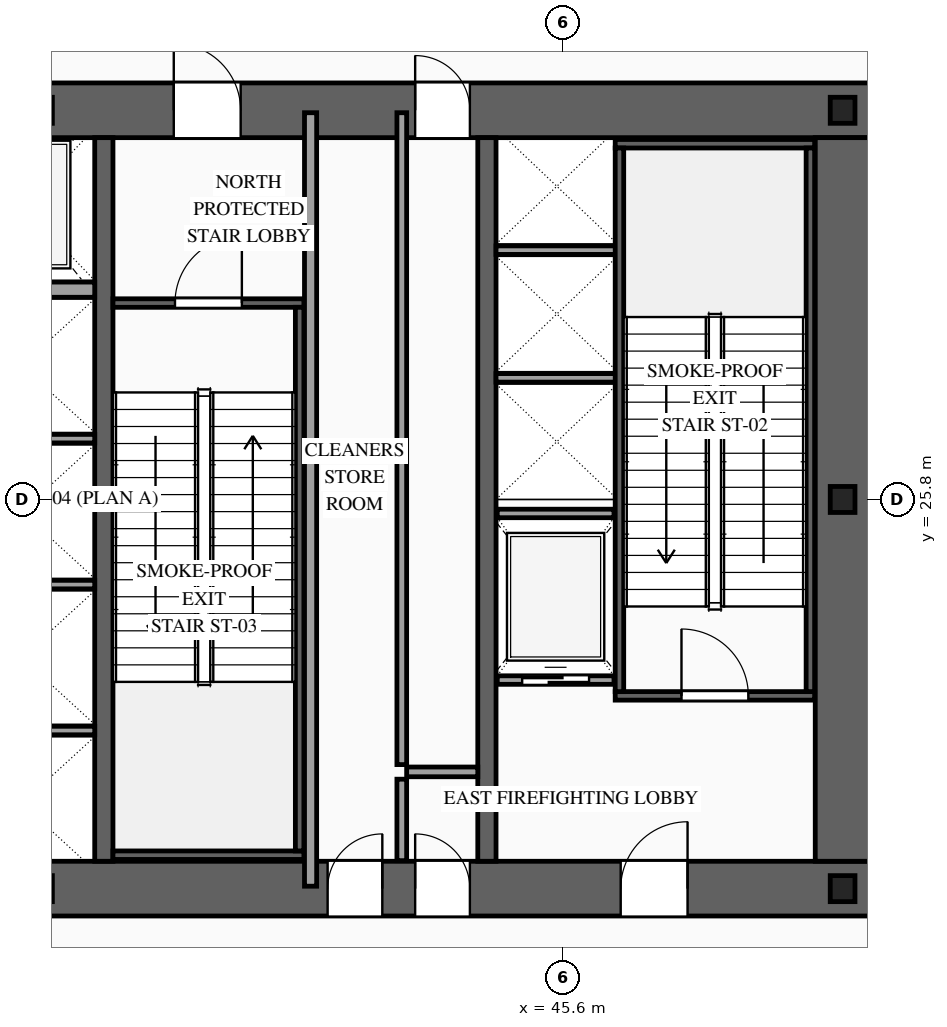
"""IFC4 building model, lengths in metres.
Left out: names, types, materials, properties, quantities, classifications, styles, units other than length and angle.
Written with IfcOpenShell. Run it as: python <this file> out.ifc"""

import sys

from ifc_helpers import new_model, si_unit, direction, frame, frame_2d, origin, origin_2d, place, context, subcontext, project, spatial, rectangle, i_section, extrude, source, transform, mapped, element, fill, save


model = new_model("IFC4")
c1 = context("Model", 3, precision=1e-05, world=origin(), true_north=direction((0.0, 1.0)))
c2 = subcontext(c1, "Body", "Model", "MODEL_VIEW")
j1 = project(units=[si_unit("LENGTHUNIT", "METRE"), si_unit("PLANEANGLEUNIT", "RADIAN")], contexts=[c1])
p1 = place(None, origin())
s1 = spatial("IfcSite", under=j1, at=p1, CompositionType="ELEMENT")
p2 = place(p1, origin())
s2 = spatial("IfcBuilding", under=s1, at=p2, CompositionType="ELEMENT")
p3 = place(p2, frame((0.0, 0.0, 19.8)))
s3 = spatial("IfcBuildingStorey", under=s2, at=p3, CompositionType="ELEMENT", Elevation=19.8)
p4 = place(p3, frame((23.35, 19.4, 0.0), z_axis=(0.0, 0.0, 1.0), x_axis=(1.0, 0.0, 0.0)))
e1 = element("IfcWall", 1, at=p4, inside=s3, PredefinedType="SHEAR", context=c2, shape_type="SweptSolid", body=[
    extrude(rectangle(XDim=27.3, YDim=0.9, at=frame_2d((13.65, 0.0))), origin(), (0.0, 0.0, 1.0), 6.0),
])
p5 = place(p4, frame((2.1, 0.0, 0.0)))
e2 = element("IfcOpeningElement", 2, at=p5, cuts=e1, PredefinedType="OPENING", context=c2, shape_type="SweptSolid", body=[
    extrude(rectangle(XDim=1.1, YDim=2.2, at=frame_2d((0.55, 1.1))), frame((0.0, 0.465, 0.0), z_axis=(0.0, -1.0, 0.0), x_axis=(1.0, 0.0, 0.0)), (0.0, 0.0, 1.0), 0.93),
])
p6 = place(p4, frame((10.0, 0.0, 0.0)))
e3 = element("IfcOpeningElement", 3, at=p6, cuts=e1, PredefinedType="OPENING", context=c2, shape_type="SweptSolid", body=[
    extrude(rectangle(XDim=1.1, YDim=2.2, at=frame_2d((0.55, 1.1))), frame((0.0, 0.465, 0.0), z_axis=(0.0, -1.0, 0.0), x_axis=(1.0, 0.0, 0.0)), (0.0, 0.0, 1.0), 0.93),
])
p7 = place(p4, frame((23.2, 0.0, 0.0)))
e4 = element("IfcOpeningElement", 4, at=p7, cuts=e1, PredefinedType="OPENING", context=c2, shape_type="SweptSolid", body=[
    extrude(rectangle(XDim=1.1, YDim=2.2, at=frame_2d((0.55, 1.1))), frame((0.0, 0.465, 0.0), z_axis=(0.0, -1.0, 0.0), x_axis=(1.0, 0.0, 0.0)), (0.0, 0.0, 1.0), 0.93),
])
p8 = place(p4, frame((19.82, 0.0, 0.0)))
e5 = element("IfcOpeningElement", 5, at=p8, cuts=e1, PredefinedType="OPENING", context=c2, shape_type="SweptSolid", body=[
    extrude(rectangle(XDim=0.9, YDim=2.15, at=frame_2d((0.45, 1.075))), frame((0.0, 0.465, 0.0), z_axis=(0.0, -1.0, 0.0), x_axis=(1.0, 0.0, 0.0)), (0.0, 0.0, 1.0), 0.93),
])
p9 = place(p4, frame((18.38, 0.0, 0.0)))
e6 = element("IfcOpeningElement", 6, at=p9, cuts=e1, PredefinedType="OPENING", context=c2, shape_type="SweptSolid", body=[
    extrude(rectangle(XDim=0.9, YDim=2.15, at=frame_2d((0.45, 1.075))), frame((0.0, 0.465, 0.0), z_axis=(0.0, -1.0, 0.0), x_axis=(1.0, 0.0, 0.0)), (0.0, 0.0, 1.0), 0.93),
])
p10 = place(p3, frame((23.35, 32.2, 0.0), z_axis=(0.0, 0.0, 1.0), x_axis=(1.0, 0.0, 0.0)))
e7 = element("IfcWall", 7, at=p10, inside=s3, PredefinedType="SHEAR", context=c2, shape_type="SweptSolid", body=[
    extrude(rectangle(XDim=27.3, YDim=0.9, at=frame_2d((13.65, 0.0))), origin(), (0.0, 0.0, 1.0), 6.0),
])
p11 = place(p10, frame((4.72, 0.0, 0.0)))
e8 = element("IfcOpeningElement", 8, at=p11, cuts=e7, PredefinedType="OPENING", context=c2, shape_type="SweptSolid", body=[
    extrude(rectangle(XDim=0.9, YDim=2.15, at=frame_2d((0.45, 1.075))), frame((0.0, 0.465, 0.0), z_axis=(0.0, -1.0, 0.0), x_axis=(1.0, 0.0, 0.0)), (0.0, 0.0, 1.0), 0.93),
])
p12 = place(p10, frame((10.0, 0.0, 0.0)))
e9 = element("IfcOpeningElement", 9, at=p12, cuts=e7, PredefinedType="OPENING", context=c2, shape_type="SweptSolid", body=[
    extrude(rectangle(XDim=1.1, YDim=2.2, at=frame_2d((0.55, 1.1))), frame((0.0, 0.465, 0.0), z_axis=(0.0, -1.0, 0.0), x_axis=(1.0, 0.0, 0.0)), (0.0, 0.0, 1.0), 0.93),
])
p13 = place(p10, frame((15.85, 0.0, 0.0)))
e10 = element("IfcOpeningElement", 10, at=p13, cuts=e7, PredefinedType="OPENING", context=c2, shape_type="SweptSolid", body=[
    extrude(rectangle(XDim=1.1, YDim=2.2, at=frame_2d((0.55, 1.1))), frame((0.0, 0.465, 0.0), z_axis=(0.0, -1.0, 0.0), x_axis=(1.0, 0.0, 0.0)), (0.0, 0.0, 1.0), 0.93),
])
p14 = place(p10, frame((19.82, 0.0, 0.0)))
e11 = element("IfcOpeningElement", 11, at=p14, cuts=e7, PredefinedType="OPENING", context=c2, shape_type="SweptSolid", body=[
    extrude(rectangle(XDim=0.9, YDim=2.15, at=frame_2d((0.45, 1.075))), frame((0.0, 0.465, 0.0), z_axis=(0.0, -1.0, 0.0), x_axis=(1.0, 0.0, 0.0)), (0.0, 0.0, 1.0), 0.93),
])
m1 = source(origin(), c2, "Body", "SweptSolid", [
    extrude(rectangle(XDim=11.9, YDim=0.9, at=frame_2d((5.95, 0.0))), origin(), (0.0, 0.0, 1.0), 6.0),
])
p15 = place(p3, frame((50.2, 19.85, 0.0), z_axis=(0.0, 0.0, 1.0), x_axis=(0.0, 1.0, 0.0)))
e12 = element("IfcWall", 12, at=p15, inside=s3, PredefinedType="SHEAR", context=c2, shape_type="MappedRepresentation", body=[
    mapped(m1, transform((0.0, 0.0, 0.0), scale=1.0)),
])
m2 = source(origin(), c2, "Body", "SweptSolid", [
    extrude(rectangle(XDim=11.9, YDim=0.3, at=frame_2d((5.95, 0.0))), origin(), (0.0, 0.0, 1.0), 6.0),
])
for number, where, z_axis, x_axis in (
    (13, (38.05, 19.85, 0.0), (0.0, 0.0, 1.0), (0.0, 1.0, 0.0)),
    (14, (44.35, 19.85, 0.0), (0.0, 0.0, 1.0), (0.0, 1.0, 0.0)),
):
    element("IfcWall", number, at=place(p3, frame(where, z_axis=z_axis, x_axis=x_axis)), inside=s3, PredefinedType="SOLIDWALL", context=c2, shape_type="MappedRepresentation", body=[
        mapped(m2, transform((0.0, 0.0, 0.0), scale=1.0)),
    ])
m3 = source(origin(), c2, "Body", "SweptSolid", [
    extrude(i_section(OverallWidth=0.407, OverallDepth=0.428, WebThickness=0.02, FlangeThickness=0.035, at=origin_2d()), origin(), (0.0, 0.0, 1.0), 6.0),
])
for number, where, z_axis, x_axis in (
    (15, (37.0, 19.4, 0.0), (0.0, 0.0, 1.0), (1.0, 0.0, 0.0)),
    (16, (50.2, 19.4, 0.0), (0.0, 0.0, 1.0), (1.0, 0.0, 0.0)),
    (17, (50.2, 25.8, 0.0), (0.0, 0.0, 1.0), (1.0, 0.0, 0.0)),
    (18, (37.0, 32.2, 0.0), (0.0, 0.0, 1.0), (1.0, 0.0, 0.0)),
    (19, (50.2, 32.2, 0.0), (0.0, 0.0, 1.0), (1.0, 0.0, 0.0)),
):
    element("IfcColumn", number, at=place(p3, frame(where, z_axis=z_axis, x_axis=x_axis)), inside=s3, PredefinedType="COLUMN", context=c2, shape_type="MappedRepresentation", body=[
        mapped(m3, transform((0.0, 0.0, 0.0), scale=1.0)),
    ])
p16 = place(p3, frame((44.52, 22.83, 0.0), z_axis=(0.0, 0.0, 1.0), x_axis=(1.0, 0.0, 0.0)))
e20 = element("IfcWall", 20, at=p16, inside=s3, PredefinedType="SOLIDWALL", context=c2, shape_type="SweptSolid", body=[
    extrude(rectangle(XDim=1.92, YDim=0.14, at=frame_2d((0.96, 0.0))), origin(), (0.0, 0.0, 1.0), 5.68),
])
p17 = place(p16, frame((0.41, 0.0, 0.0)))
e21 = element("IfcOpeningElement", 21, at=p17, cuts=e20, PredefinedType="OPENING", context=c2, shape_type="SweptSolid", body=[
    extrude(rectangle(XDim=1.1, YDim=2.2, at=frame_2d((0.55, 1.1))), frame((0.0, 0.085, 0.0), z_axis=(0.0, -1.0, 0.0), x_axis=(1.0, 0.0, 0.0)), (0.0, 0.0, 1.0), 0.17),
])
m4 = source(origin(), c2, "Body", "SweptSolid", [
    extrude(rectangle(XDim=1.92, YDim=0.14, at=frame_2d((0.96, 0.0))), origin(), (0.0, 0.0, 1.0), 5.68),
])
p18 = place(p3, frame((44.52, 25.57, 0.0), z_axis=(0.0, 0.0, 1.0), x_axis=(1.0, 0.0, 0.0)))
e22 = element("IfcWall", 22, at=p18, inside=s3, PredefinedType="SOLIDWALL", context=c2, shape_type="MappedRepresentation", body=[
    mapped(m4, transform((0.0, 0.0, 0.0), scale=1.0)),
])
m5 = source(origin(), c2, "Body", "SweptSolid", [
    extrude(rectangle(XDim=2.4, YDim=0.14, at=frame_2d((1.2, 0.0))), origin(), (0.0, 0.0, 1.0), 5.68),
])
for number, where, z_axis, x_axis in (
    (23, (35.5, 22.0, 0.0), (0.0, 0.0, 1.0), (1.0, 0.0, 0.0)),
    (24, (35.5, 24.4, 0.0), (0.0, 0.0, 1.0), (1.0, 0.0, 0.0)),
    (25, (35.5, 26.8, 0.0), (0.0, 0.0, 1.0), (1.0, 0.0, 0.0)),
):
    element("IfcWall", number, at=place(p3, frame(where, z_axis=z_axis, x_axis=x_axis)), inside=s3, PredefinedType="SOLIDWALL", context=c2, shape_type="MappedRepresentation", body=[
        mapped(m5, transform((0.0, 0.0, 0.0), scale=1.0)),
    ])
m6 = source(origin(), c2, "Body", "SweptSolid", [
    extrude(rectangle(XDim=2.4, YDim=0.25, at=frame_2d((1.2, 0.0))), origin(), (0.0, 0.0, 1.0), 5.68),
])
p19 = place(p3, frame((35.5, 29.25, 0.0), z_axis=(0.0, 0.0, 1.0), x_axis=(1.0, 0.0, 0.0)))
e26 = element("IfcWall", 26, at=p19, inside=s3, PredefinedType="SOLIDWALL", context=c2, shape_type="MappedRepresentation", body=[
    mapped(m6, transform((0.0, 0.0, 0.0), scale=1.0)),
])
m7 = source(origin(), c2, "Body", "SweptSolid", [
    extrude(rectangle(XDim=2.0, YDim=0.14, at=frame_2d((1.0, 0.0))), origin(), (0.0, 0.0, 1.0), 5.68),
])
for number, where, z_axis, x_axis in (
    (27, (44.5, 27.8, 0.0), (0.0, 0.0, 1.0), (1.0, 0.0, 0.0)),
    (28, (44.5, 29.9, 0.0), (0.0, 0.0, 1.0), (1.0, 0.0, 0.0)),
):
    element("IfcWall", number, at=place(p3, frame(where, z_axis=z_axis, x_axis=x_axis)), inside=s3, PredefinedType="SOLIDWALL", context=c2, shape_type="MappedRepresentation", body=[
        mapped(m7, transform((0.0, 0.0, 0.0), scale=1.0)),
    ])
p20 = place(p3, frame((46.46, 22.57, 0.0), z_axis=(0.0, 0.0, 1.0), x_axis=(1.0, 0.0, 0.0)))
e29 = element("IfcWall", 29, at=p20, inside=s3, PredefinedType="SOLIDWALL", context=c2, shape_type="SweptSolid", body=[
    extrude(rectangle(XDim=3.28, YDim=0.14, at=frame_2d((1.64, 0.0))), origin(), (0.0, 0.0, 1.0), 5.68),
])
p21 = place(p20, frame((1.09, 0.0, 0.0)))
e30 = element("IfcOpeningElement", 30, at=p21, cuts=e29, PredefinedType="OPENING", context=c2, shape_type="SweptSolid", body=[
    extrude(rectangle(XDim=1.1, YDim=2.2, at=frame_2d((0.55, 1.1))), frame((0.0, 0.085, 0.0), z_axis=(0.0, -1.0, 0.0), x_axis=(1.0, 0.0, 0.0)), (0.0, 0.0, 1.0), 0.17),
])
m8 = source(origin(), c2, "Body", "SweptSolid", [
    extrude(rectangle(XDim=3.28, YDim=0.14, at=frame_2d((1.64, 0.0))), origin(), (0.0, 0.0, 1.0), 5.68),
])
p22 = place(p3, frame((46.46, 31.65, 0.0), z_axis=(0.0, 0.0, 1.0), x_axis=(1.0, 0.0, 0.0)))
e31 = element("IfcWall", 31, at=p22, inside=s3, PredefinedType="SOLIDWALL", context=c2, shape_type="MappedRepresentation", body=[
    mapped(m8, transform((0.0, 0.0, 0.0), scale=1.0)),
])
m9 = source(origin(), c2, "Body", "SweptSolid", [
    extrude(rectangle(XDim=8.94, YDim=0.14, at=frame_2d((4.47, 0.0))), origin(), (0.0, 0.0, 1.0), 5.68),
])
for number, where, z_axis, x_axis in (
    (32, (46.53, 22.64, 0.0), (0.0, 0.0, 1.0), (0.0, 1.0, 0.0)),
    (33, (49.67, 22.64, 0.0), (0.0, 0.0, 1.0), (0.0, 1.0, 0.0)),
):
    element("IfcWall", number, at=place(p3, frame(where, z_axis=z_axis, x_axis=x_axis)), inside=s3, PredefinedType="SOLIDWALL", context=c2, shape_type="MappedRepresentation", body=[
        mapped(m9, transform((0.0, 0.0, 0.0), scale=1.0)),
    ])
p23 = place(p3, frame((38.2, 29.03, 0.0), z_axis=(0.0, 0.0, 1.0), x_axis=(1.0, 0.0, 0.0)))
e34 = element("IfcWall", 34, at=p23, inside=s3, PredefinedType="SOLIDWALL", context=c2, shape_type="SweptSolid", body=[
    extrude(rectangle(XDim=3.14, YDim=0.14, at=frame_2d((1.57, 0.0))), origin(), (0.0, 0.0, 1.0), 5.68),
])
p24 = place(p23, frame((1.02, 0.0, 0.0)))
e35 = element("IfcOpeningElement", 35, at=p24, cuts=e34, PredefinedType="OPENING", context=c2, shape_type="SweptSolid", body=[
    extrude(rectangle(XDim=1.1, YDim=2.2, at=frame_2d((0.55, 1.1))), frame((0.0, 0.085, 0.0), z_axis=(0.0, -1.0, 0.0), x_axis=(1.0, 0.0, 0.0)), (0.0, 0.0, 1.0), 0.17),
])
m10 = source(origin(), c2, "Body", "SweptSolid", [
    extrude(rectangle(XDim=3.14, YDim=0.14, at=frame_2d((1.57, 0.0))), origin(), (0.0, 0.0, 1.0), 5.68),
])
p25 = place(p3, frame((38.2, 19.95, 0.0), z_axis=(0.0, 0.0, 1.0), x_axis=(1.0, 0.0, 0.0)))
e36 = element("IfcWall", 36, at=p25, inside=s3, PredefinedType="SOLIDWALL", context=c2, shape_type="MappedRepresentation", body=[
    mapped(m10, transform((0.0, 0.0, 0.0), scale=1.0)),
])
m11 = source(origin(), c2, "Body", "SweptSolid", [
    extrude(rectangle(XDim=8.94, YDim=0.14, at=frame_2d((4.47, 0.0))), origin(), (0.0, 0.0, 1.0), 5.68),
])
p26 = place(p3, frame((41.27, 20.02, 0.0), z_axis=(0.0, 0.0, 1.0), x_axis=(0.0, 1.0, 0.0)))
e37 = element("IfcWall", 37, at=p26, inside=s3, PredefinedType="SOLIDWALL", context=c2, shape_type="MappedRepresentation", body=[
    mapped(m11, transform((0.0, 0.0, 0.0), scale=1.0)),
])
m12 = source(origin(), c2, "Body", "SweptSolid", [
    extrude(rectangle(XDim=1.34, YDim=0.16, at=frame_2d((0.67, 0.0))), origin(), (0.0, 0.0, 1.0), 5.68),
])
p27 = place(p3, frame((42.95, 19.86, 0.0), z_axis=(0.0, 0.0, 1.0), x_axis=(0.0, 1.0, 0.0)))
e38 = element("IfcWall", 38, at=p27, inside=s3, PredefinedType="PARTITIONING", context=c2, shape_type="MappedRepresentation", body=[
    mapped(m12, transform((0.0, 0.0, 0.0), scale=1.0)),
])
m13 = source(origin(), c2, "Body", "SweptSolid", [
    extrude(rectangle(XDim=1.17, YDim=0.16, at=frame_2d((0.585, 0.0))), origin(), (0.0, 0.0, 1.0), 5.68),
])
p28 = place(p3, frame((43.03, 21.32, 0.0), z_axis=(0.0, 0.0, 1.0), x_axis=(1.0, 0.0, 0.0)))
e39 = element("IfcWall", 39, at=p28, inside=s3, PredefinedType="PARTITIONING", context=c2, shape_type="MappedRepresentation", body=[
    mapped(m13, transform((0.0, 0.0, 0.0), scale=1.0)),
])
m14 = source(origin(), c2, "Body", "SweptSolid", [
    extrude(rectangle(XDim=12.72, YDim=0.2, at=frame_2d((6.36, 0.0))), origin(), (0.0, 0.0, 1.0), 5.68),
])
p29 = place(p3, frame((41.45, 19.44, 0.0), z_axis=(0.0, 0.0, 1.0), x_axis=(0.0, 1.0, 0.0)))
e40 = element("IfcWall", 40, at=p29, inside=s3, PredefinedType="PARTITIONING", context=c2, shape_type="MappedRepresentation", body=[
    mapped(m14, transform((0.0, 0.0, 0.0), scale=1.0)),
])
m15 = source(origin(), c2, "Body", "SweptSolid", [
    extrude(rectangle(XDim=10.72, YDim=0.16, at=frame_2d((5.36, 0.0))), origin(), (0.0, 0.0, 1.0), 5.68),
])
p30 = place(p3, frame((42.95, 21.44, 0.0), z_axis=(0.0, 0.0, 1.0), x_axis=(0.0, 1.0, 0.0)))
e41 = element("IfcWall", 41, at=p30, inside=s3, PredefinedType="PARTITIONING", context=c2, shape_type="MappedRepresentation", body=[
    mapped(m15, transform((0.0, 0.0, 0.0), scale=1.0)),
])
m16 = source(origin(), c2, "Body", "SweptSolid", [
    extrude(rectangle(XDim=1.1, YDim=2.2, at=frame_2d((0.55, 1.1))), frame((0.0, 0.025, 0.0), z_axis=(0.0, -1.0, 0.0), x_axis=(1.0, 0.0, 0.0)), (0.0, 0.0, 1.0), 0.05),
])
p31 = place(p17, origin())
e42 = element("IfcDoor", 42, at=p31, inside=s3, OperationType="SLIDING_TO_RIGHT", PredefinedType="DOOR", context=c2, shape_type="MappedRepresentation", body=[
    mapped(m16, transform((0.0, 0.0, 0.0), scale=1.0)),
])
fill(e21, e42)
m17 = source(origin(), c2, "Body", "SweptSolid", [
    extrude(rectangle(XDim=1.1, YDim=2.2, at=frame_2d((0.55, 1.1))), frame((0.0, 0.025, 0.0), z_axis=(0.0, -1.0, 0.0), x_axis=(1.0, 0.0, 0.0)), (0.0, 0.0, 1.0), 0.05),
])
p32 = place(p21, origin())
e43 = element("IfcDoor", 43, at=p32, inside=s3, OperationType="SINGLE_SWING_LEFT", PredefinedType="DOOR", context=c2, shape_type="MappedRepresentation", body=[
    mapped(m17, transform((0.0, 0.0, 0.0), scale=1.0)),
])
fill(e30, e43)
p33 = place(p24, origin())
e44 = element("IfcDoor", 44, at=p33, inside=s3, OperationType="SINGLE_SWING_RIGHT", PredefinedType="DOOR", context=c2, shape_type="MappedRepresentation", body=[
    mapped(m17, transform((0.0, 0.0, 0.0), scale=1.0)),
])
fill(e35, e44)
p34 = place(p7, origin())
e45 = element("IfcDoor", 45, at=p34, inside=s3, OperationType="SINGLE_SWING_RIGHT", PredefinedType="DOOR", context=c2, shape_type="MappedRepresentation", body=[
    mapped(m17, transform((0.0, 0.0, 0.0), scale=1.0)),
])
fill(e4, e45)
p35 = place(p13, origin())
e46 = element("IfcDoor", 46, at=p35, inside=s3, OperationType="SINGLE_SWING_LEFT", PredefinedType="DOOR", context=c2, shape_type="MappedRepresentation", body=[
    mapped(m17, transform((0.0, 0.0, 0.0), scale=1.0)),
])
fill(e10, e46)
m18 = source(origin(), c2, "Body", "SweptSolid", [
    extrude(rectangle(XDim=0.9, YDim=2.15, at=frame_2d((0.45, 1.075))), frame((0.0, 0.025, 0.0), z_axis=(0.0, -1.0, 0.0), x_axis=(1.0, 0.0, 0.0)), (0.0, 0.0, 1.0), 0.05),
])
p36 = place(p8, origin())
e47 = element("IfcDoor", 47, at=p36, inside=s3, OperationType="SINGLE_SWING_LEFT", PredefinedType="DOOR", context=c2, shape_type="MappedRepresentation", body=[
    mapped(m18, transform((0.0, 0.0, 0.0), scale=1.0)),
])
fill(e5, e47)
p37 = place(p9, origin())
e48 = element("IfcDoor", 48, at=p37, inside=s3, OperationType="SINGLE_SWING_RIGHT", PredefinedType="DOOR", context=c2, shape_type="MappedRepresentation", body=[
    mapped(m18, transform((0.0, 0.0, 0.0), scale=1.0)),
])
fill(e6, e48)
p38 = place(p14, origin())
e49 = element("IfcDoor", 49, at=p38, inside=s3, OperationType="SINGLE_SWING_LEFT", PredefinedType="DOOR", context=c2, shape_type="MappedRepresentation", body=[
    mapped(m18, transform((0.0, 0.0, 0.0), scale=1.0)),
])
fill(e11, e49)
save(model, sys.argv[1])
